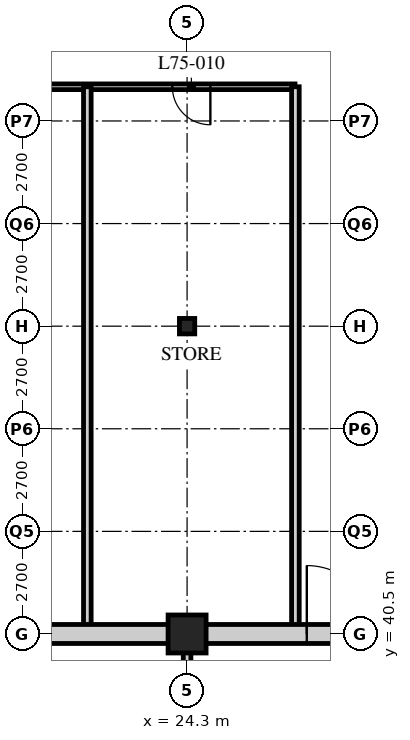
"""IFC4 building model, lengths in metres.
Left out: names, types, materials, properties, quantities, classifications, styles, units other than length and angle.
Written with IfcOpenShell. Run it as: python <this file> out.ifc"""

import sys

from ifc_helpers import new_model, si_unit, direction, frame, frame_2d, origin, origin_2d, place, context, subcontext, project, spatial, rectangle, hollow_rectangle, i_section, extrude, element, fill, save


model = new_model("IFC4")
c1 = context("Model", 3, precision=1e-05, world=origin(), true_north=direction((0.0, 1.0)))
c2 = subcontext(c1, "Body", "Model", "MODEL_VIEW")
j1 = project(units=[si_unit("LENGTHUNIT", "METRE"), si_unit("PLANEANGLEUNIT", "RADIAN")], contexts=[c1])
p1 = place(None, origin())
s1 = spatial("IfcSite", under=j1, at=p1, CompositionType="ELEMENT")
p2 = place(p1, origin())
s2 = spatial("IfcBuilding", under=s1, at=p2, CompositionType="ELEMENT")
p3 = place(p2, frame((0.0, 0.0, 293.1)))
s3 = spatial("IfcBuildingStorey", under=s2, at=p3, CompositionType="ELEMENT", Elevation=293.1)
p4 = place(p3, frame((24.3, 40.5, 0.0), z_axis=(0.0, 0.0, 1.0), x_axis=(1.0, 0.0, 0.0)))
e1 = element("IfcColumn", 1, at=p4, inside=s3, PredefinedType="COLUMN", context=c2, shape_type="SweptSolid", body=[
    extrude(hollow_rectangle(XDim=1.0, YDim=1.0, WallThickness=0.1, at=origin_2d()), origin(), (0.0, 0.0, 1.0), 5.4),
])
p5 = place(p3, frame((24.3, 48.6, 0.0), z_axis=(0.0, 0.0, 1.0), x_axis=(1.0, 0.0, 0.0)))
e2 = element("IfcColumn", 2, at=p5, inside=s3, PredefinedType="COLUMN", context=c2, shape_type="SweptSolid", body=[
    extrude(i_section(OverallWidth=0.403, OverallDepth=0.406, WebThickness=0.027, FlangeThickness=0.043, FilletRadius=0.015, at=origin_2d()), origin(), (0.0, 0.0, 1.0), 5.4),
])
p6 = place(p3, frame((27.14, 54.9, 0.0), z_axis=(0.0, 0.0, 1.0), x_axis=(-1.0, 0.0, 0.0)))
e3 = element("IfcWall", 3, at=p6, inside=s3, PredefinedType="PARTITIONING", context=c2, shape_type="SweptSolid", body=[
    extrude(rectangle(XDim=17.24, YDim=0.15, at=frame_2d((8.62, 0.0))), origin(), (0.0, 0.0, 1.0), 5.19),
])
p7 = place(p6, frame((13.59, 0.0, 0.0)))
e4 = element("IfcOpeningElement", 4, at=p7, cuts=e3, PredefinedType="OPENING", context=c2, shape_type="SweptSolid", body=[
    extrude(rectangle(XDim=1.0, YDim=2.1, at=frame_2d((0.5, 1.05))), frame((0.0, 0.085, 0.0), z_axis=(0.0, -1.0, 0.0), x_axis=(1.0, 0.0, 0.0)), (0.0, 0.0, 1.0), 0.17),
])
p8 = place(p6, frame((7.702, 0.0, 0.0)))
e5 = element("IfcOpeningElement", 5, at=p8, cuts=e3, PredefinedType="OPENING", context=c2, shape_type="SweptSolid", body=[
    extrude(rectangle(XDim=1.0, YDim=2.1, at=frame_2d((0.5, 1.05))), frame((0.0, 0.085, 0.0), z_axis=(0.0, -1.0, 0.0), x_axis=(1.0, 0.0, 0.0)), (0.0, 0.0, 1.0), 0.17),
])
p9 = place(p6, frame((2.228, 0.0, 0.0)))
e6 = element("IfcOpeningElement", 6, at=p9, cuts=e3, PredefinedType="OPENING", context=c2, shape_type="SweptSolid", body=[
    extrude(rectangle(XDim=1.0, YDim=2.1, at=frame_2d((0.5, 1.05))), frame((0.0, 0.085, 0.0), z_axis=(0.0, -1.0, 0.0), x_axis=(1.0, 0.0, 0.0)), (0.0, 0.0, 1.0), 0.17),
])
for number, where, z_axis, x_axis in (
    (7, (21.675, 54.9, 0.0), (0.0, 0.0, 1.0), (0.0, -1.0, 0.0)),
    (8, (27.15, 40.5, 0.0), (0.0, 0.0, 1.0), (0.0, 1.0, 0.0)),
):
    element("IfcWall", number, at=place(p3, frame(where, z_axis=z_axis, x_axis=x_axis)), inside=s3, PredefinedType="SOLIDWALL", context=c2, shape_type="SweptSolid", body=[
        extrude(rectangle(XDim=14.4, YDim=0.2, at=frame_2d((7.2, 0.0))), origin(), (0.0, 0.0, 1.0), 5.19),
    ])
p10 = place(p3, frame((15.95, 40.5, 0.0), z_axis=(0.0, 0.0, 1.0), x_axis=(1.0, 0.0, 0.0)))
e9 = element("IfcWall", 9, at=p10, inside=s3, PredefinedType="SOLIDWALL", context=c2, shape_type="SweptSolid", body=[
    extrude(rectangle(XDim=24.8, YDim=0.5, at=frame_2d((12.4, 0.0))), origin(), (0.0, 0.0, 1.0), 4.271),
])
p11 = place(p10, frame((11.5, 0.0, 0.0)))
e10 = element("IfcOpeningElement", 10, at=p11, cuts=e9, PredefinedType="OPENING", context=c2, shape_type="SweptSolid", body=[
    extrude(rectangle(XDim=1.8, YDim=2.4, at=frame_2d((0.9, 1.2))), frame((0.0, 0.26, 0.0), z_axis=(0.0, -1.0, 0.0), x_axis=(1.0, 0.0, 0.0)), (0.0, 0.0, 1.0), 0.52),
])
p12 = place(p3, frame((24.3, 32.5, 0.0), z_axis=(0.0, 0.0, 1.0), x_axis=(0.0, 1.0, 0.0)))
e11 = element("IfcWall", 11, at=p12, inside=s3, PredefinedType="PARTITIONING", context=c2, shape_type="SweptSolid", body=[
    extrude(rectangle(XDim=7.75, YDim=0.2, at=frame_2d((3.875, 0.0))), origin(), (0.0, 0.0, 1.0), 4.428),
])
p13 = place(p12, frame((1.475, 0.0, 0.0)))
e12 = element("IfcOpeningElement", 12, at=p13, cuts=e11, PredefinedType="OPENING", context=c2, shape_type="SweptSolid", body=[
    extrude(rectangle(XDim=0.9, YDim=2.1, at=frame_2d((0.45, 1.05))), frame((0.0, 0.11, 0.0), z_axis=(0.0, -1.0, 0.0), x_axis=(1.0, 0.0, 0.0)), (0.0, 0.0, 1.0), 0.22),
])
p14 = place(p12, frame((4.25, 0.0, 0.0)))
e13 = element("IfcOpeningElement", 13, at=p14, cuts=e11, PredefinedType="OPENING", context=c2, shape_type="SweptSolid", body=[
    extrude(rectangle(XDim=1.0, YDim=2.1, at=frame_2d((0.5, 1.05))), frame((0.0, 0.11, 0.0), z_axis=(0.0, -1.0, 0.0), x_axis=(1.0, 0.0, 0.0)), (0.0, 0.0, 1.0), 0.22),
])
p15 = place(p12, frame((6.2, 0.0, 0.0)))
e14 = element("IfcOpeningElement", 14, at=p15, cuts=e11, PredefinedType="OPENING", context=c2, shape_type="SweptSolid", body=[
    extrude(rectangle(XDim=0.9, YDim=2.1, at=frame_2d((0.45, 1.05))), frame((0.0, 0.11, 0.0), z_axis=(0.0, -1.0, 0.0), x_axis=(1.0, 0.0, 0.0)), (0.0, 0.0, 1.0), 0.22),
])
p16 = place(p9, origin())
e15 = element("IfcDoor", 15, at=p16, inside=s3, OperationType="SINGLE_SWING_LEFT", PredefinedType="DOOR", context=c2, shape_type="SweptSolid", body=[
    extrude(rectangle(XDim=1.0, YDim=2.1, at=frame_2d((0.5, 1.05))), frame((0.0, 0.025, 0.0), z_axis=(0.0, -1.0, 0.0), x_axis=(1.0, 0.0, 0.0)), (0.0, 0.0, 1.0), 0.05),
])
fill(e6, e15)
p17 = place(p11, origin())
e16 = element("IfcDoor", 16, at=p17, inside=s3, OperationType="DOUBLE_DOOR_SINGLE_SWING", PredefinedType="DOOR", context=c2, shape_type="SweptSolid", body=[
    extrude(rectangle(XDim=1.8, YDim=2.4, at=frame_2d((0.9, 1.2))), frame((0.0, 0.025, 0.0), z_axis=(0.0, -1.0, 0.0), x_axis=(1.0, 0.0, 0.0)), (0.0, 0.0, 1.0), 0.05),
])
fill(e10, e16)
save(model, sys.argv[1])
